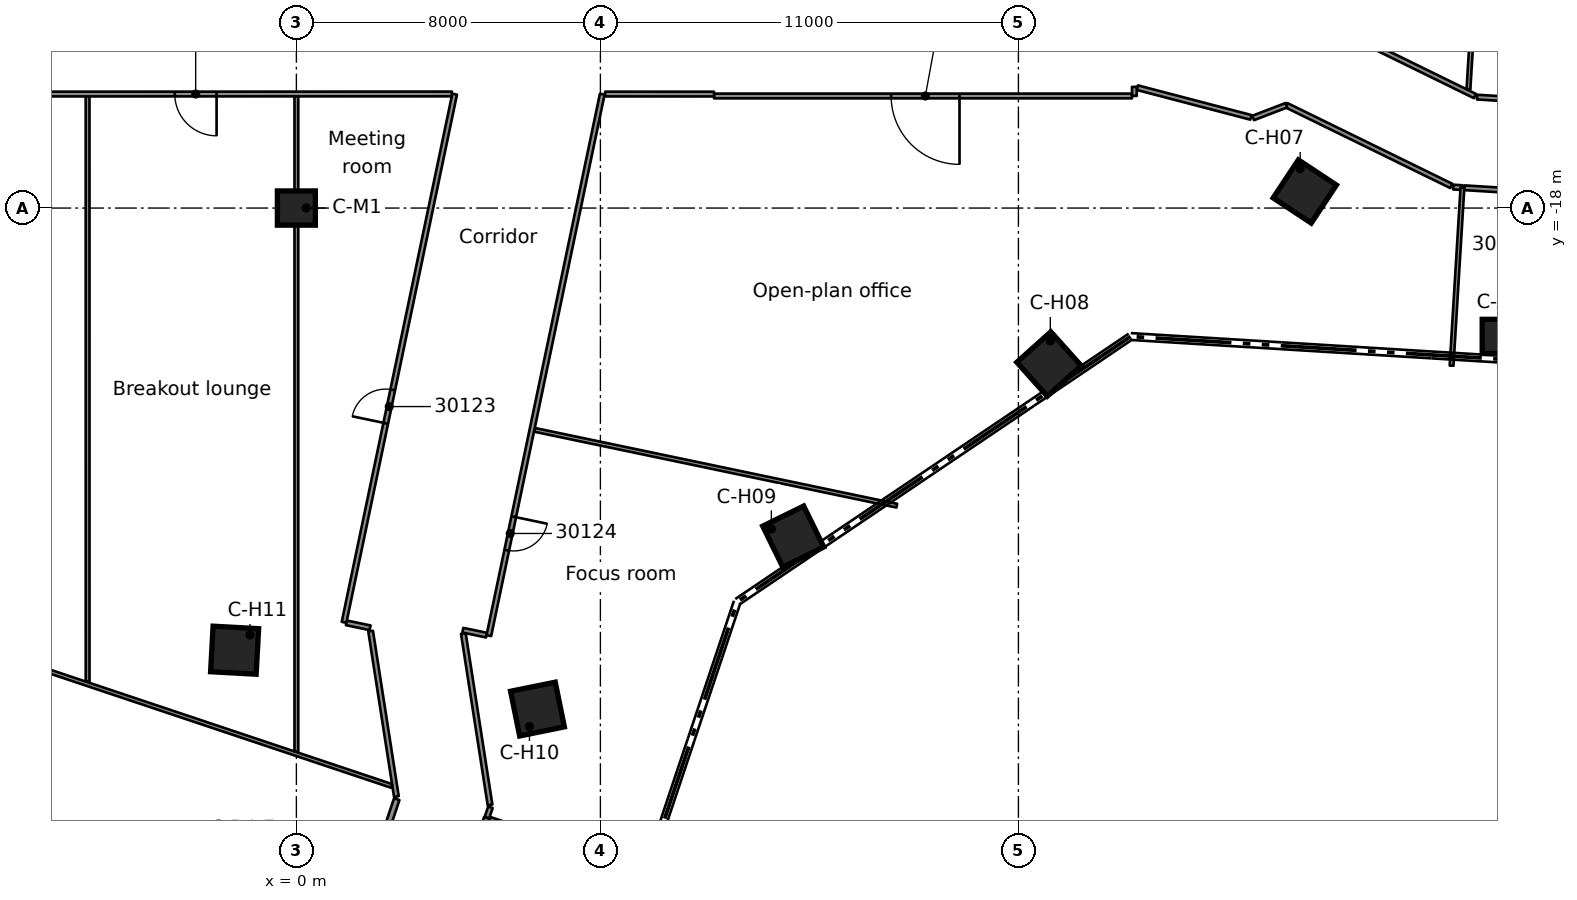
"""IFC4 building model, lengths in metres.
Left out: names, types, materials, properties, quantities, classifications, styles, units other than length and angle.
Written with IfcOpenShell. Run it as: python <this file> out.ifc"""

import sys

from ifc_helpers import new_model, si_unit, direction, frame, frame_2d, origin, origin_2d, place, context, subcontext, project, spatial, rectangle, extrude, element, fill, save


model = new_model("IFC4")
c1 = context("Model", 3, precision=1e-05, world=origin(), true_north=direction((0.0, 1.0)))
c2 = subcontext(c1, "Body", "Model", "MODEL_VIEW")
j1 = project(units=[si_unit("LENGTHUNIT", "METRE"), si_unit("PLANEANGLEUNIT", "RADIAN")], contexts=[c1])
p1 = place(None, origin())
s1 = spatial("IfcSite", under=j1, at=p1, CompositionType="ELEMENT")
p2 = place(p1, origin())
s2 = spatial("IfcBuilding", under=s1, at=p2, CompositionType="ELEMENT")
p3 = place(p2, frame((0.0, 0.0, 152.6)))
s3 = spatial("IfcBuildingStorey", under=s2, at=p3, CompositionType="ELEMENT", Elevation=152.6)
p4 = place(p3, frame((31.754, -21.378, 0.0), z_axis=(0.0, 0.0, 1.0), x_axis=(1.0, 0.0, 0.0)))
e1 = element("IfcColumn", 1, at=p4, inside=s3, PredefinedType="COLUMN", context=c2, shape_type="SweptSolid", body=[
    extrude(rectangle(XDim=1.1, YDim=0.9, at=origin_2d()), origin(), (0.0, 0.0, 1.0), 3.5),
])
for number, where, z_axis, x_axis in (
    (2, (26.536, -17.564, 0.0), (0.0, 0.0, 1.0), (0.834, -0.552, 0.0)),
    (3, (19.806, -22.104, 0.0), (0.0, 0.0, 1.0), (0.667, -0.745, 0.0)),
    (4, (13.075, -26.644, 0.0), (0.0, 0.0, 1.0), (0.441, -0.898, 0.0)),
    (5, (6.344, -31.183, 0.0), (0.0, 0.0, 1.0), (0.199, -0.98, 0.0)),
    (6, (-1.625, -29.634, 0.0), (0.0, 0.0, 1.0), (-0.055, -0.998, 0.0)),
):
    element("IfcColumn", number, at=place(p3, frame(where, z_axis=z_axis, x_axis=x_axis)), inside=s3, PredefinedType="COLUMN", context=c2, shape_type="SweptSolid", body=[
        extrude(rectangle(XDim=1.2, YDim=1.2, at=origin_2d()), origin(), (0.0, 0.0, 1.0), 3.5),
    ])
p5 = place(p3, frame((0.0, -18.0, 0.0), z_axis=(0.0, 0.0, 1.0), x_axis=(1.0, 0.0, 0.0)))
e7 = element("IfcColumn", 7, at=p5, inside=s3, PredefinedType="COLUMN", context=c2, shape_type="SweptSolid", body=[
    extrude(rectangle(XDim=1.0, YDim=0.9, at=origin_2d()), origin(), (0.0, 0.0, 1.0), 3.5),
])
p6 = place(p3, frame((-5.494, -15.062, 0.0), z_axis=(0.0, 0.0, 1.0), x_axis=(6.3425617e-05, -0.999999997989, 0.0)))
e8 = element("IfcWall", 8, at=p6, inside=s3, PredefinedType="PARTITIONING", context=c2, shape_type="SweptSolid", body=[
    extrude(rectangle(XDim=15.397, YDim=0.1, at=frame_2d((7.698, 0.0))), origin(), (0.0, 0.0, 1.0), 3.08),
])
p7 = place(p3, frame((2.632, -33.485, 0.0), z_axis=(0.0, 0.0, 1.0), x_axis=(-0.153927089286, 0.988082208717, 0.0)))
e9 = element("IfcWall", 9, at=p7, inside=s3, PredefinedType="PARTITIONING", context=c2, shape_type="SweptSolid", body=[
    extrude(rectangle(XDim=4.405, YDim=0.125, at=frame_2d((2.202, 0.0))), origin(), (0.0, 0.0, 1.0), 3.08),
])
p8 = place(p3, frame((4.394, -29.196, 0.0), z_axis=(0.0, 0.0, 1.0), x_axis=(0.153813799922, -0.9880998507, 0.0)))
e10 = element("IfcWall", 10, at=p8, inside=s3, PredefinedType="PARTITIONING", context=c2, shape_type="SweptSolid", body=[
    extrude(rectangle(XDim=4.563, YDim=0.125, at=frame_2d((2.282, 0.0))), origin(), (0.0, 0.0, 1.0), 3.08),
])
p9 = place(p3, frame((26.052, -15.294, 0.0), z_axis=(0.0, 0.0, 1.0), x_axis=(0.898165349965, -0.43965782618, 0.0)))
e11 = element("IfcWall", 11, at=p9, inside=s3, PredefinedType="PARTITIONING", context=c2, shape_type="SweptSolid", body=[
    extrude(rectangle(XDim=4.831, YDim=0.125, at=frame_2d((2.416, 0.0))), origin(), (0.0, 0.0, 1.0), 3.08),
])
p10 = place(p3, frame((31.014, -15.053, 0.0), z_axis=(0.0, 0.0, 1.0), x_axis=(-0.897926088568, 0.440146270538, 0.0)))
e12 = element("IfcWall", 12, at=p10, inside=s3, PredefinedType="PARTITIONING", context=c2, shape_type="SweptSolid", body=[
    extrude(rectangle(XDim=5.289, YDim=0.125, at=frame_2d((2.645, 0.0))), origin(), (0.0, 0.0, 1.0), 3.08),
])
p11 = place(p3, frame((-23.923, -30.274, 0.0), z_axis=(0.0, 0.0, 1.0), x_axis=(0.948327152728, -0.317294203223, 0.0)))
e13 = element("IfcWall", 13, at=p11, inside=s3, PredefinedType="PARTITIONING", context=c2, shape_type="SweptSolid", body=[
    extrude(rectangle(XDim=26.162, YDim=0.15, at=frame_2d((13.081, 0.0))), origin(), (0.0, 0.0, 1.0), 3.08),
])
p12 = place(p3, frame((-21.98, -25.012, 0.0), z_axis=(0.0, 0.0, 1.0), x_axis=(0.948316725504, -0.31732536635, 0.0)))
e14 = element("IfcWall", 14, at=p12, inside=s3, PredefinedType="PARTITIONING", context=c2, shape_type="SweptSolid", body=[
    extrude(rectangle(XDim=25.819, YDim=0.1, at=frame_2d((12.91, 0.0))), origin(), (0.0, 0.0, 1.0), 3.08),
])
p13 = place(p3, frame((5.084, -34.068, 0.0), z_axis=(0.0, 0.0, 1.0), x_axis=(0.948370959481, -0.317163243793, 0.0)))
e15 = element("IfcWall", 15, at=p13, inside=s3, PredefinedType="PARTITIONING", context=c2, shape_type="SweptSolid", body=[
    extrude(rectangle(XDim=4.619, YDim=0.1, at=frame_2d((2.309, 0.0))), origin(), (0.0, 0.0, 1.0), 3.08),
])
p14 = place(p3, frame((22.129, -14.832, 0.0), z_axis=(0.0, 0.0, 1.0), x_axis=(0.967419716648, -0.25317798451, 0.0)))
e16 = element("IfcWall", 16, at=p14, inside=s3, PredefinedType="PARTITIONING", context=c2, shape_type="SweptSolid", body=[
    extrude(rectangle(XDim=3.089, YDim=0.125, at=frame_2d((1.544, 0.0))), origin(), (0.0, 0.0, 1.0), 3.08),
])
p15 = place(p3, frame((4.38, -29.107, 0.0), z_axis=(0.0, 0.0, 1.0), x_axis=(0.978635010671, -0.205605242852, 0.0)))
e17 = element("IfcWall", 17, at=p15, inside=s3, PredefinedType="PARTITIONING", context=c2, shape_type="SweptSolid", body=[
    extrude(rectangle(XDim=0.638, YDim=0.125, at=frame_2d((0.319, 0.0))), origin(), (0.0, 0.0, 1.0), 3.08),
])
p16 = place(p3, frame((1.316, -28.914, 0.0), z_axis=(0.0, 0.0, 1.0), x_axis=(0.979018641563, -0.203770703174, 0.0)))
e18 = element("IfcWall", 18, at=p16, inside=s3, PredefinedType="PARTITIONING", context=c2, shape_type="SweptSolid", body=[
    extrude(rectangle(XDim=0.637, YDim=0.125, at=frame_2d((0.319, 0.0))), origin(), (0.0, 0.0, 1.0), 3.08),
])
p17 = place(p3, frame((6.263, -23.835, 0.0), z_axis=(0.0, 0.0, 1.0), x_axis=(0.978787353233, -0.204878786483, 0.0)))
e19 = element("IfcWall", 19, at=p17, inside=s3, PredefinedType="PARTITIONING", context=c2, shape_type="SweptSolid", body=[
    extrude(rectangle(XDim=9.743, YDim=0.1, at=frame_2d((4.872, 0.0))), origin(), (0.0, 0.0, 1.0), 3.08),
])
p18 = place(p3, frame((30.445, -17.448, 0.0), z_axis=(0.0, 0.0, 1.0), x_axis=(0.998064460788, -0.062187877536, 0.0)))
e20 = element("IfcWall", 20, at=p18, inside=s3, PredefinedType="PARTITIONING", context=c2, shape_type="SweptSolid", body=[
    extrude(rectangle(XDim=0.24, YDim=0.125, at=frame_2d((0.12, 0.0))), origin(), (0.0, 0.0, 1.0), 3.08),
])
p19 = place(p3, frame((40.923, -18.089, 0.0), z_axis=(0.0, 0.0, 1.0), x_axis=(-0.998135704692, 0.06103372034, 0.0)))
e21 = element("IfcWall", 21, at=p19, inside=s3, PredefinedType="PARTITIONING", context=c2, shape_type="SweptSolid", body=[
    extrude(rectangle(XDim=10.208, YDim=0.125, at=frame_2d((5.104, 0.0))), origin(), (0.0, 0.0, 1.0), 3.08),
])
p20 = place(p19, frame((7.938, 0.0, 0.0)))
e22 = element("IfcOpeningElement", 22, at=p20, cuts=e21, PredefinedType="OPENING", context=c2, shape_type="SweptSolid", body=[
    extrude(rectangle(XDim=0.9, YDim=2.1, at=frame_2d((0.45, 1.05))), frame((0.0, 0.073, 0.0), z_axis=(0.0, -1.0, 0.0), x_axis=(1.0, 0.0, 0.0)), (0.0, 0.0, 1.0), 0.145),
])
p21 = place(p3, frame((31.07, -15.081, 0.0), z_axis=(0.0, 0.0, 1.0), x_axis=(0.998141754277, -0.060934705778, 0.0)))
e23 = element("IfcWall", 23, at=p21, inside=s3, PredefinedType="PARTITIONING", context=c2, shape_type="SweptSolid", body=[
    extrude(rectangle(XDim=9.992, YDim=0.125, at=frame_2d((4.996, 0.0))), origin(), (0.0, 0.0, 1.0), 3.08),
])
p22 = place(p21, frame((2.1, 0.0, 0.0)))
e24 = element("IfcOpeningElement", 24, at=p22, cuts=e23, PredefinedType="OPENING", context=c2, shape_type="SweptSolid", body=[
    extrude(rectangle(XDim=0.9, YDim=2.1, at=frame_2d((0.45, 1.05))), frame((0.0, 0.073, 0.0), z_axis=(0.0, -1.0, 0.0), x_axis=(1.0, 0.0, 0.0)), (0.0, 0.0, 1.0), 0.145),
])
p23 = place(p3, frame((21.988, -15.051, 0.0), z_axis=(0.0, 0.0, 1.0), x_axis=(-1.0, 0.0, 0.0)))
e25 = element("IfcWall", 25, at=p23, inside=s3, PredefinedType="PARTITIONING", context=c2, shape_type="SweptSolid", body=[
    extrude(rectangle(XDim=10.997, YDim=0.125, at=frame_2d((5.499, 0.0))), origin(), (0.0, 0.0, 1.0), 3.08),
])
p24 = place(p23, frame((4.538, 0.0, 0.0)))
e26 = element("IfcOpeningElement", 26, at=p24, cuts=e25, PredefinedType="OPENING", context=c2, shape_type="SweptSolid", body=[
    extrude(rectangle(XDim=1.8, YDim=2.1, at=frame_2d((0.9, 1.05))), frame((0.0, 0.073, 0.0), z_axis=(0.0, -1.0, 0.0), x_axis=(1.0, 0.0, 0.0)), (0.0, 0.0, 1.0), 0.145),
])
p25 = place(p3, frame((4.091, -14.998, 0.0), z_axis=(0.0, 0.0, 1.0), x_axis=(-0.999999981131, -0.000194262769, 0.0)))
e27 = element("IfcWall", 27, at=p25, inside=s3, PredefinedType="PARTITIONING", context=c2, shape_type="SweptSolid", body=[
    extrude(rectangle(XDim=15.081, YDim=0.125, at=frame_2d((7.541, 0.0))), origin(), (0.0, 0.0, 1.0), 3.08),
])
p26 = place(p25, frame((11.935, 0.0, 0.0)))
e28 = element("IfcOpeningElement", 28, at=p26, cuts=e27, PredefinedType="OPENING", context=c2, shape_type="SweptSolid", body=[
    extrude(rectangle(XDim=0.9, YDim=2.1, at=frame_2d((0.45, 1.05))), frame((0.0, 0.073, 0.0), z_axis=(0.0, -1.0, 0.0), x_axis=(1.0, 0.0, 0.0)), (0.0, 0.0, 1.0), 0.145),
])
p27 = place(p25, frame((6.191, 0.0, 0.0)))
e29 = element("IfcOpeningElement", 29, at=p27, cuts=e27, PredefinedType="OPENING", context=c2, shape_type="SweptSolid", body=[
    extrude(rectangle(XDim=1.1, YDim=2.1, at=frame_2d((0.55, 1.05))), frame((0.0, 0.073, 0.0), z_axis=(0.0, -1.0, 0.0), x_axis=(1.0, 0.0, 0.0)), (0.0, 0.0, 1.0), 0.145),
])
p28 = place(p3, frame((8.125, -15.0, 0.0), z_axis=(0.0, 0.0, 1.0), x_axis=(0.999999941907, -0.000340860653, 0.0)))
e30 = element("IfcWall", 30, at=p28, inside=s3, PredefinedType="PARTITIONING", context=c2, shape_type="SweptSolid", body=[
    extrude(rectangle(XDim=2.865, YDim=0.125, at=frame_2d((1.433, 0.0))), origin(), (0.0, 0.0, 1.0), 3.08),
])
p29 = place(p3, frame((5.013, -34.044, 0.0), z_axis=(0.0, 0.0, 1.0), x_axis=(0.318483843222, 0.947928289274, 0.0)))
e31 = element("IfcWall", 31, at=p29, inside=s3, PredefinedType="PARTITIONING", context=c2, shape_type="SweptSolid", body=[
    extrude(rectangle(XDim=0.292, YDim=0.125, at=frame_2d((0.146, 0.0))), origin(), (0.0, 0.0, 1.0), 3.08),
])
p30 = place(p3, frame((5.012, -34.044, 0.0), z_axis=(0.0, 0.0, 1.0), x_axis=(-0.317228830318, -0.948349022889, 0.0)))
e32 = element("IfcWall", 32, at=p30, inside=s3, PredefinedType="PARTITIONING", context=c2, shape_type="SweptSolid", body=[
    extrude(rectangle(XDim=24.506, YDim=0.15, at=frame_2d((12.253, 0.0))), origin(), (0.0, 0.0, 1.0), 3.08),
])
p31 = place(p30, frame((2.349, 0.0, 0.0)))
e33 = element("IfcOpeningElement", 33, at=p31, cuts=e32, PredefinedType="OPENING", context=c2, shape_type="SweptSolid", body=[
    extrude(rectangle(XDim=1.0, YDim=2.1, at=frame_2d((0.5, 1.05))), frame((0.0, 0.085, 0.0), z_axis=(0.0, -1.0, 0.0), x_axis=(1.0, 0.0, 0.0)), (0.0, 0.0, 1.0), 0.17),
])
p32 = place(p30, frame((7.705, 0.0, 0.0)))
e34 = element("IfcOpeningElement", 34, at=p32, cuts=e32, PredefinedType="OPENING", context=c2, shape_type="SweptSolid", body=[
    extrude(rectangle(XDim=1.0, YDim=2.1, at=frame_2d((0.5, 1.05))), frame((0.0, 0.085, 0.0), z_axis=(0.0, -1.0, 0.0), x_axis=(1.0, 0.0, 0.0)), (0.0, 0.0, 1.0), 0.17),
])
p33 = place(p3, frame((-1.008, -44.475, 0.0), z_axis=(0.0, 0.0, 1.0), x_axis=(0.316889155775, 0.948462578572, 0.0)))
e35 = element("IfcWall", 35, at=p33, inside=s3, PredefinedType="PARTITIONING", context=c2, shape_type="SweptSolid", body=[
    extrude(rectangle(XDim=11.516, YDim=0.15, at=frame_2d((5.758, 0.0))), origin(), (0.0, 0.0, 1.0), 3.08),
])
p34 = place(p3, frame((25.178, -15.63, 0.0), z_axis=(0.0, 0.0, 1.0), x_axis=(0.933426221906, 0.358769408196, 0.0)))
e36 = element("IfcWall", 36, at=p34, inside=s3, PredefinedType="PARTITIONING", context=c2, shape_type="SweptSolid", body=[
    extrude(rectangle(XDim=0.936, YDim=0.125, at=frame_2d((0.468, 0.0))), origin(), (0.0, 0.0, 1.0), 3.08),
])
p35 = place(p3, frame((8.049, -15.003, 0.0), z_axis=(0.0, 0.0, 1.0), x_axis=(-0.205007019442, -0.97876050287, 0.0)))
e37 = element("IfcWall", 37, at=p35, inside=s3, PredefinedType="PARTITIONING", context=c2, shape_type="SweptSolid", body=[
    extrude(rectangle(XDim=14.556, YDim=0.125, at=frame_2d((7.278, 0.0))), origin(), (0.0, 0.0, 1.0), 3.08),
])
p36 = place(p35, frame((11.36, 0.0, 0.0)))
e38 = element("IfcOpeningElement", 38, at=p36, cuts=e37, PredefinedType="OPENING", context=c2, shape_type="SweptSolid", body=[
    extrude(rectangle(XDim=0.9, YDim=2.1, at=frame_2d((0.45, 1.05))), frame((0.0, 0.073, 0.0), z_axis=(0.0, -1.0, 0.0), x_axis=(1.0, 0.0, 0.0)), (0.0, 0.0, 1.0), 0.145),
])
p37 = place(p3, frame((1.255, -28.9, 0.0), z_axis=(0.0, 0.0, 1.0), x_axis=(0.204949727958, 0.978772501151, 0.0)))
e39 = element("IfcWall", 39, at=p37, inside=s3, PredefinedType="PARTITIONING", context=c2, shape_type="SweptSolid", body=[
    extrude(rectangle(XDim=14.199, YDim=0.125, at=frame_2d((7.1, 0.0))), origin(), (0.0, 0.0, 1.0), 3.08),
])
p38 = place(p37, frame((5.35, 0.0, 0.0)))
e40 = element("IfcOpeningElement", 40, at=p38, cuts=e39, PredefinedType="OPENING", context=c2, shape_type="SweptSolid", body=[
    extrude(rectangle(XDim=0.9, YDim=2.1, at=frame_2d((0.45, 1.05))), frame((0.0, 0.073, 0.0), z_axis=(0.0, -1.0, 0.0), x_axis=(1.0, 0.0, 0.0)), (0.0, 0.0, 1.0), 0.145),
])
p39 = place(p3, frame((30.398, -22.147, 0.0), z_axis=(0.0, 0.0, 1.0), x_axis=(0.060972554319, 0.998139442974, 0.0)))
e41 = element("IfcWall", 41, at=p39, inside=s3, PredefinedType="PARTITIONING", context=c2, shape_type="SweptSolid", body=[
    extrude(rectangle(XDim=4.693, YDim=0.1, at=frame_2d((2.346, 0.0))), origin(), (0.0, 0.0, 1.0), 3.08),
])
p40 = place(p3, frame((30.842, -14.879, 0.0), z_axis=(0.0, 0.0, 1.0), x_axis=(0.061072336712, 0.998133342639, 0.0)))
e42 = element("IfcWall", 42, at=p40, inside=s3, PredefinedType="PARTITIONING", context=c2, shape_type="SweptSolid", body=[
    extrude(rectangle(XDim=25.92, YDim=0.1, at=frame_2d((12.96, 0.0))), origin(), (0.0, 0.0, 1.0), 3.08),
])
p41 = place(p3, frame((22.051, -15.05, 0.0), z_axis=(0.0, 0.0, 1.0), x_axis=(0.0, 1.0, 0.0)))
e43 = element("IfcWall", 43, at=p41, inside=s3, PredefinedType="PARTITIONING", context=c2, shape_type="SweptSolid", body=[
    extrude(rectangle(XDim=0.239, YDim=0.125, at=frame_2d((0.12, 0.0))), origin(), (0.0, 0.0, 1.0), 3.08),
])
p42 = place(p3, frame((0.0, -32.297, 0.0), z_axis=(0.0, 0.0, 1.0), x_axis=(0.0, 1.0, 0.0)))
e44 = element("IfcWall", 44, at=p42, inside=s3, PredefinedType="PARTITIONING", context=c2, shape_type="SweptSolid", body=[
    extrude(rectangle(XDim=17.235, YDim=0.1, at=frame_2d((8.618, 0.0))), origin(), (0.0, 0.0, 1.0), 3.08),
])
p43 = place(p27, origin())
e45 = element("IfcDoor", 45, at=p43, inside=s3, OperationType="SINGLE_SWING_LEFT", PredefinedType="DOOR", context=c2, shape_type="SweptSolid", body=[
    extrude(rectangle(XDim=1.1, YDim=2.1, at=frame_2d((0.55, 1.05))), frame((0.0, 0.025, 0.0), z_axis=(0.0, -1.0, 0.0), x_axis=(1.0, 0.0, 0.0)), (0.0, 0.0, 1.0), 0.05),
])
fill(e29, e45)
p44 = place(p38, origin())
e46 = element("IfcDoor", 46, at=p44, inside=s3, OperationType="SINGLE_SWING_LEFT", PredefinedType="DOOR", context=c2, shape_type="SweptSolid", body=[
    extrude(rectangle(XDim=0.9, YDim=2.1, at=frame_2d((0.45, 1.05))), frame((0.0, 0.025, 0.0), z_axis=(0.0, -1.0, 0.0), x_axis=(1.0, 0.0, 0.0)), (0.0, 0.0, 1.0), 0.05),
])
fill(e40, e46)
p45 = place(p36, origin())
e47 = element("IfcDoor", 47, at=p45, inside=s3, OperationType="SINGLE_SWING_RIGHT", PredefinedType="DOOR", context=c2, shape_type="SweptSolid", body=[
    extrude(rectangle(XDim=0.9, YDim=2.1, at=frame_2d((0.45, 1.05))), frame((0.0, 0.025, 0.0), z_axis=(0.0, -1.0, 0.0), x_axis=(1.0, 0.0, 0.0)), (0.0, 0.0, 1.0), 0.05),
])
fill(e38, e47)
p46 = place(p24, origin())
e48 = element("IfcDoor", 48, at=p46, inside=s3, OperationType="DOUBLE_DOOR_SINGLE_SWING", PredefinedType="DOOR", context=c2, shape_type="SweptSolid", body=[
    extrude(rectangle(XDim=1.8, YDim=2.1, at=frame_2d((0.9, 1.05))), frame((0.0, 0.025, 0.0), z_axis=(0.0, -1.0, 0.0), x_axis=(1.0, 0.0, 0.0)), (0.0, 0.0, 1.0), 0.05),
])
fill(e26, e48)
save(model, sys.argv[1])
